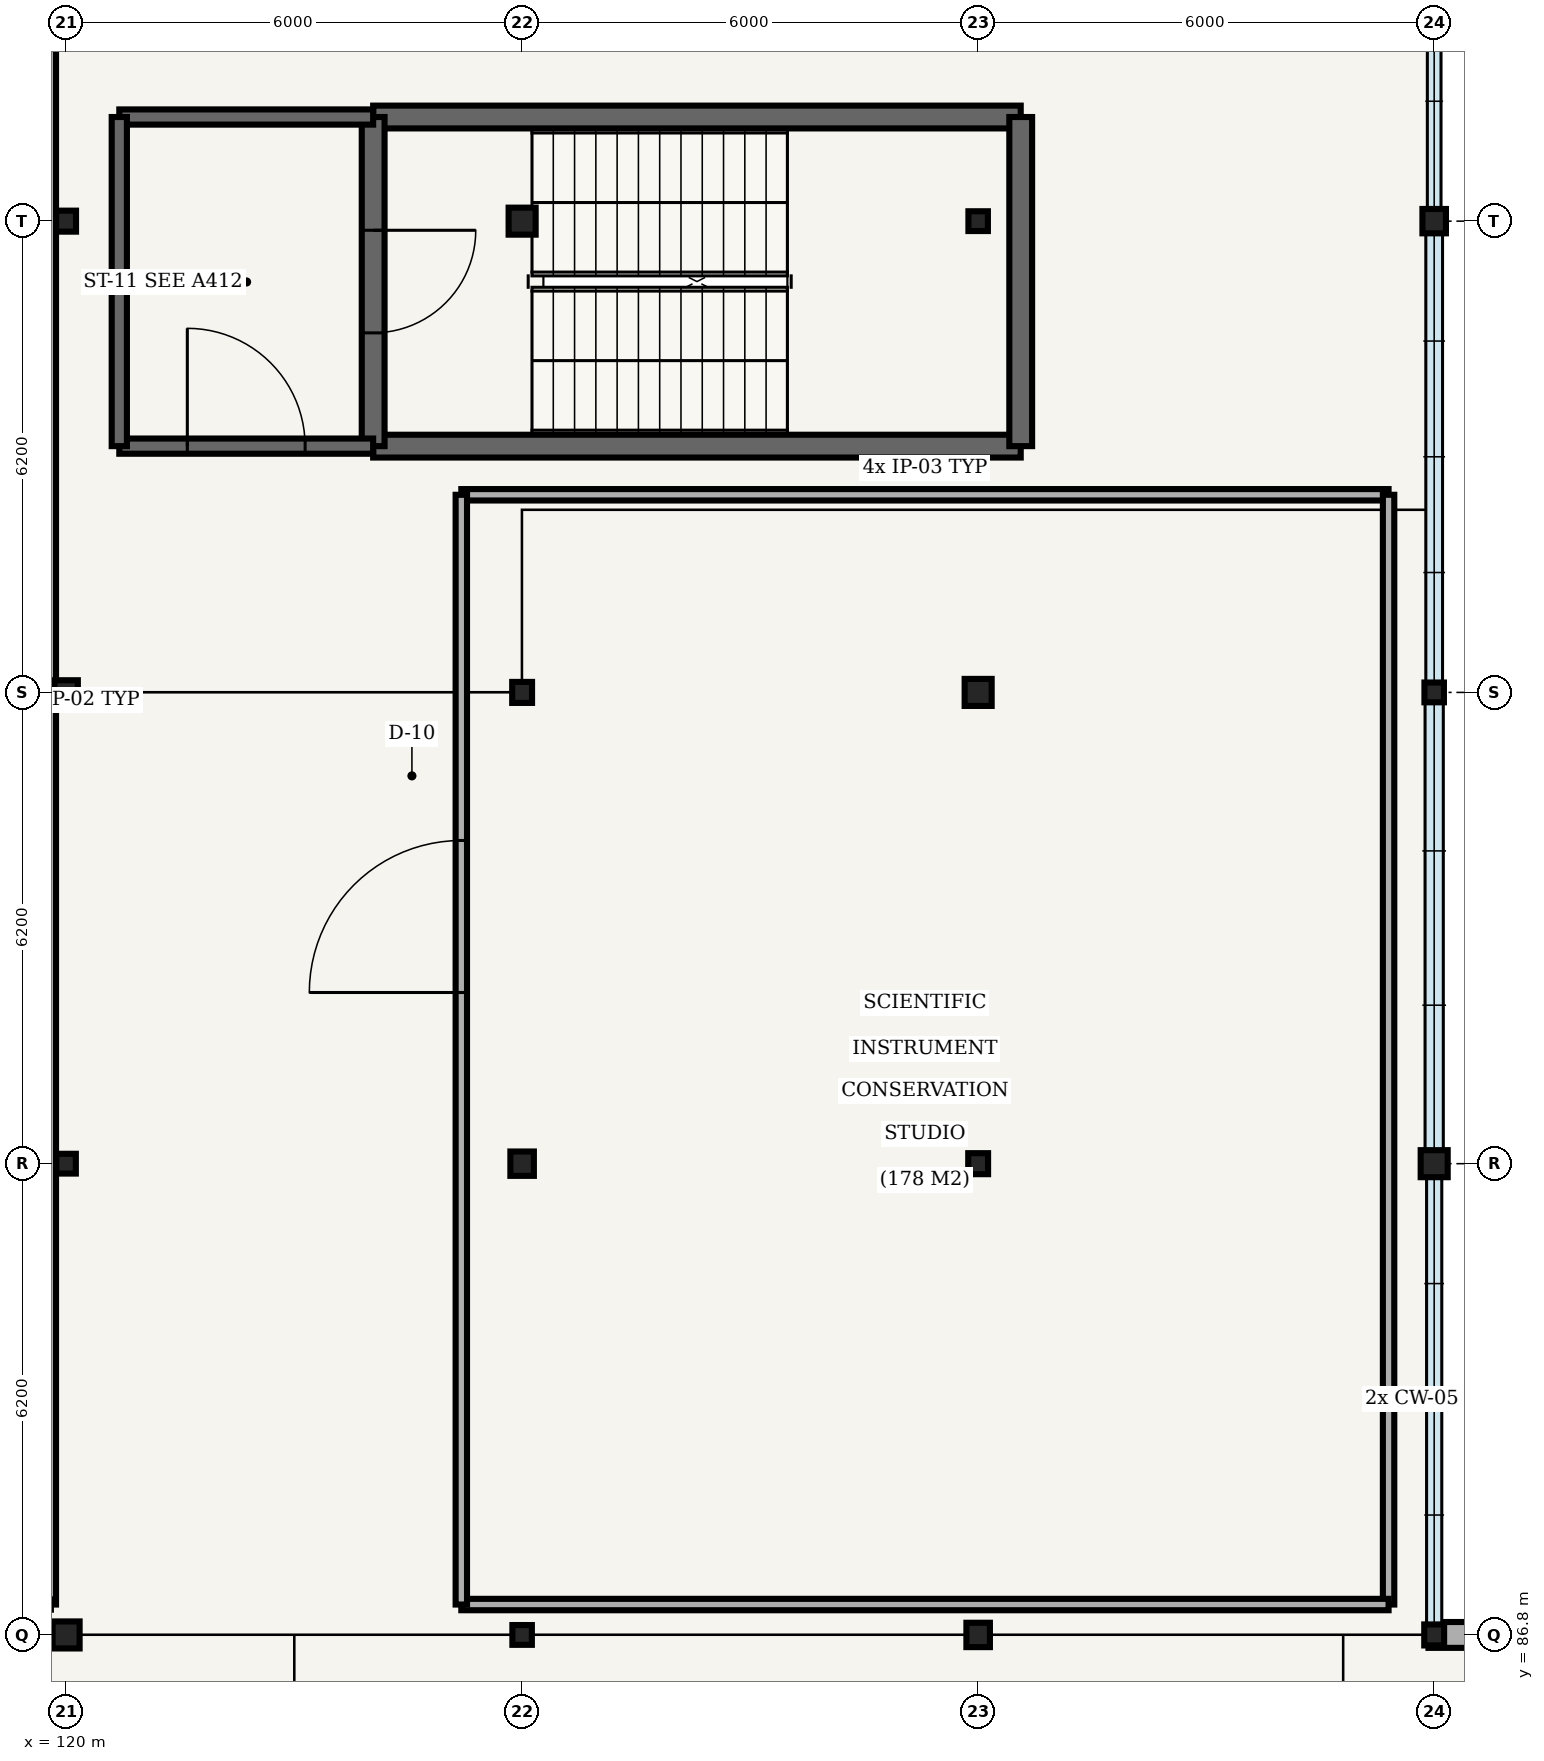
"""IFC4 building model, lengths in metres.
Left out: names, types, materials, properties, quantities, classifications, styles, units other than length and angle.
Written with IfcOpenShell. Run it as: python <this file> out.ifc"""

import sys

from ifc_helpers import new_model, si_unit, direction, frame, frame_2d, origin, origin_2d, place, context, subcontext, project, spatial, rectangle, hollow_circle, i_section, extrude, element, fill, save


model = new_model("IFC4")
c1 = context("Model", 3, precision=1e-05, world=origin(), true_north=direction((0.0, 1.0)))
c2 = subcontext(c1, "Body", "Model", "MODEL_VIEW")
j1 = project(units=[si_unit("LENGTHUNIT", "METRE"), si_unit("PLANEANGLEUNIT", "RADIAN")], contexts=[c1])
p1 = place(None, origin())
s1 = spatial("IfcSite", under=j1, at=p1, CompositionType="ELEMENT")
p2 = place(p1, origin())
s2 = spatial("IfcBuilding", under=s1, at=p2, CompositionType="ELEMENT")
p3 = place(p2, frame((0.0, 0.0, 10.8)))
s3 = spatial("IfcBuildingStorey", under=s2, at=p3, CompositionType="ELEMENT", Elevation=10.8)
p4 = place(p3, frame((120.0, 86.8, 0.0), z_axis=(0.0, 0.0, 1.0), x_axis=(1.0, 0.0, 0.0)))
e1 = element("IfcColumn", 1, at=p4, inside=s3, PredefinedType="COLUMN", context=c2, shape_type="SweptSolid", body=[
    extrude(hollow_circle(Radius=0.178, WallThickness=0.012, at=origin_2d()), origin(), (0.0, 0.0, 1.0), 4.8),
])
p5 = place(p3, frame((120.0, 93.0, 0.0), z_axis=(0.0, 0.0, 1.0), x_axis=(1.0, 0.0, 0.0)))
e2 = element("IfcColumn", 2, at=p5, inside=s3, PredefinedType="COLUMN", context=c2, shape_type="SweptSolid", body=[
    extrude(i_section(OverallWidth=0.256, OverallDepth=0.26, WebThickness=0.01, FlangeThickness=0.017, FilletRadius=0.013, at=origin_2d()), origin(), (0.0, 0.0, 1.0), 4.8),
])
p6 = place(p3, frame((120.0, 99.2, 0.0), z_axis=(0.0, 0.0, 1.0), x_axis=(1.0, 0.0, 0.0)))
e3 = element("IfcColumn", 3, at=p6, inside=s3, PredefinedType="COLUMN", context=c2, shape_type="SweptSolid", body=[
    extrude(i_section(OverallWidth=0.309, OverallDepth=0.321, WebThickness=0.014, FlangeThickness=0.022, FilletRadius=0.015, at=origin_2d()), origin(), (0.0, 0.0, 1.0), 4.8),
])
p7 = place(p3, frame((120.0, 105.4, 0.0), z_axis=(0.0, 0.0, 1.0), x_axis=(1.0, 0.0, 0.0)))
e4 = element("IfcColumn", 4, at=p7, inside=s3, PredefinedType="COLUMN", context=c2, shape_type="SweptSolid", body=[
    extrude(i_section(OverallWidth=0.261, OverallDepth=0.276, WebThickness=0.015, FlangeThickness=0.025, FilletRadius=0.013, at=origin_2d()), origin(), (0.0, 0.0, 1.0), 4.8),
])
p8 = place(p3, frame((126.0, 86.8, 0.0), z_axis=(0.0, 0.0, 1.0), x_axis=(1.0, 0.0, 0.0)))
e5 = element("IfcColumn", 5, at=p8, inside=s3, PredefinedType="COLUMN", context=c2, shape_type="SweptSolid", body=[
    extrude(i_section(OverallWidth=0.256, OverallDepth=0.26, WebThickness=0.01, FlangeThickness=0.017, FilletRadius=0.013, at=origin_2d()), origin(), (0.0, 0.0, 1.0), 4.8),
])
p9 = place(p3, frame((126.0, 93.0, 0.0), z_axis=(0.0, 0.0, 1.0), x_axis=(1.0, 0.0, 0.0)))
e6 = element("IfcColumn", 6, at=p9, inside=s3, PredefinedType="COLUMN", context=c2, shape_type="SweptSolid", body=[
    extrude(i_section(OverallWidth=0.309, OverallDepth=0.321, WebThickness=0.014, FlangeThickness=0.022, FilletRadius=0.015, at=origin_2d()), origin(), (0.0, 0.0, 1.0), 4.8),
])
p10 = place(p3, frame((126.0, 99.2, 0.0), z_axis=(0.0, 0.0, 1.0), x_axis=(1.0, 0.0, 0.0)))
e7 = element("IfcColumn", 7, at=p10, inside=s3, PredefinedType="COLUMN", context=c2, shape_type="SweptSolid", body=[
    extrude(i_section(OverallWidth=0.261, OverallDepth=0.276, WebThickness=0.015, FlangeThickness=0.025, FilletRadius=0.013, at=origin_2d()), origin(), (0.0, 0.0, 1.0), 4.8),
])
p11 = place(p3, frame((126.0, 105.4, 0.0), z_axis=(0.0, 0.0, 1.0), x_axis=(1.0, 0.0, 0.0)))
e8 = element("IfcColumn", 8, at=p11, inside=s3, PredefinedType="COLUMN", context=c2, shape_type="SweptSolid", body=[
    extrude(hollow_circle(Radius=0.178, WallThickness=0.012, at=origin_2d()), origin(), (0.0, 0.0, 1.0), 4.8),
])
p12 = place(p3, frame((132.0, 86.8, 0.0), z_axis=(0.0, 0.0, 1.0), x_axis=(1.0, 0.0, 0.0)))
e9 = element("IfcColumn", 9, at=p12, inside=s3, PredefinedType="COLUMN", context=c2, shape_type="SweptSolid", body=[
    extrude(i_section(OverallWidth=0.309, OverallDepth=0.321, WebThickness=0.014, FlangeThickness=0.022, FilletRadius=0.015, at=origin_2d()), origin(), (0.0, 0.0, 1.0), 4.8),
])
p13 = place(p3, frame((132.0, 93.0, 0.0), z_axis=(0.0, 0.0, 1.0), x_axis=(1.0, 0.0, 0.0)))
e10 = element("IfcColumn", 10, at=p13, inside=s3, PredefinedType="COLUMN", context=c2, shape_type="SweptSolid", body=[
    extrude(i_section(OverallWidth=0.261, OverallDepth=0.276, WebThickness=0.015, FlangeThickness=0.025, FilletRadius=0.013, at=origin_2d()), origin(), (0.0, 0.0, 1.0), 4.8),
])
p14 = place(p3, frame((132.0, 99.2, 0.0), z_axis=(0.0, 0.0, 1.0), x_axis=(1.0, 0.0, 0.0)))
e11 = element("IfcColumn", 11, at=p14, inside=s3, PredefinedType="COLUMN", context=c2, shape_type="SweptSolid", body=[
    extrude(hollow_circle(Radius=0.178, WallThickness=0.012, at=origin_2d()), origin(), (0.0, 0.0, 1.0), 4.8),
])
p15 = place(p3, frame((132.0, 105.4, 0.0), z_axis=(0.0, 0.0, 1.0), x_axis=(1.0, 0.0, 0.0)))
e12 = element("IfcColumn", 12, at=p15, inside=s3, PredefinedType="COLUMN", context=c2, shape_type="SweptSolid", body=[
    extrude(i_section(OverallWidth=0.256, OverallDepth=0.26, WebThickness=0.01, FlangeThickness=0.017, FilletRadius=0.013, at=origin_2d()), origin(), (0.0, 0.0, 1.0), 4.8),
])
p16 = place(p3, frame((138.0, 86.8, 0.0), z_axis=(0.0, 0.0, 1.0), x_axis=(1.0, 0.0, 0.0)))
e13 = element("IfcColumn", 13, at=p16, inside=s3, PredefinedType="COLUMN", context=c2, shape_type="SweptSolid", body=[
    extrude(i_section(OverallWidth=0.261, OverallDepth=0.276, WebThickness=0.015, FlangeThickness=0.025, FilletRadius=0.013, at=origin_2d()), origin(), (0.0, 0.0, 1.0), 4.8),
])
p17 = place(p3, frame((138.0, 93.0, 0.0), z_axis=(0.0, 0.0, 1.0), x_axis=(1.0, 0.0, 0.0)))
e14 = element("IfcColumn", 14, at=p17, inside=s3, PredefinedType="COLUMN", context=c2, shape_type="SweptSolid", body=[
    extrude(hollow_circle(Radius=0.178, WallThickness=0.012, at=origin_2d()), origin(), (0.0, 0.0, 1.0), 4.8),
])
p18 = place(p3, frame((138.0, 99.2, 0.0), z_axis=(0.0, 0.0, 1.0), x_axis=(1.0, 0.0, 0.0)))
e15 = element("IfcColumn", 15, at=p18, inside=s3, PredefinedType="COLUMN", context=c2, shape_type="SweptSolid", body=[
    extrude(i_section(OverallWidth=0.256, OverallDepth=0.26, WebThickness=0.01, FlangeThickness=0.017, FilletRadius=0.013, at=origin_2d()), origin(), (0.0, 0.0, 1.0), 4.8),
])
p19 = place(p3, frame((138.0, 105.4, 0.0), z_axis=(0.0, 0.0, 1.0), x_axis=(1.0, 0.0, 0.0)))
e16 = element("IfcColumn", 16, at=p19, inside=s3, PredefinedType="COLUMN", context=c2, shape_type="SweptSolid", body=[
    extrude(i_section(OverallWidth=0.309, OverallDepth=0.321, WebThickness=0.014, FlangeThickness=0.022, FilletRadius=0.015, at=origin_2d()), origin(), (0.0, 0.0, 1.0), 4.8),
])
p20 = place(p3, frame((144.075, 86.8, 0.0), z_axis=(0.0, 0.0, 1.0), x_axis=(-1.0, 0.0, 0.0)))
e17 = element("IfcWall", 17, at=p20, inside=s3, PredefinedType="SOLIDWALL", context=c2, shape_type="SweptSolid", body=[
    extrude(rectangle(XDim=6.15, YDim=0.34, at=frame_2d((3.075, 0.0))), origin(), (0.0, 0.0, 1.0), 3.84),
])
p21 = place(p20, frame((2.45, 0.0, 0.9)))
e18 = element("IfcOpeningElement", 18, at=p21, cuts=e17, PredefinedType="OPENING", context=c2, shape_type="SweptSolid", body=[
    extrude(rectangle(XDim=1.25, YDim=1.95, at=frame_2d((0.625, 0.975))), frame((0.0, 0.18, 0.0), z_axis=(0.0, -1.0, 0.0), x_axis=(1.0, 0.0, 0.0)), (0.0, 0.0, 1.0), 0.36),
])
for number, where, z_axis, x_axis in (
    (19, (124.04, 102.44, 0.0), (0.0, 0.0, 1.0), (1.0, 0.0, 0.0)),
    (20, (132.56, 106.77, 0.0), (0.0, 0.0, 1.0), (-1.0, 0.0, 0.0)),
):
    element("IfcWall", number, at=place(p3, frame(where, z_axis=z_axis, x_axis=x_axis)), inside=s3, PredefinedType="SHEAR", context=c2, shape_type="SweptSolid", body=[
        extrude(rectangle(XDim=8.52, YDim=0.3, at=frame_2d((4.26, 0.0))), origin(), (0.0, 0.0, 1.0), 4.55),
    ])
p22 = place(p3, frame((124.04, 106.77, 0.0), z_axis=(0.0, 0.0, 1.0), x_axis=(0.0, -1.0, 0.0)))
e21 = element("IfcWall", 21, at=p22, inside=s3, PredefinedType="SHEAR", context=c2, shape_type="SweptSolid", body=[
    extrude(rectangle(XDim=4.33, YDim=0.3, at=frame_2d((2.165, 0.0))), origin(), (0.0, 0.0, 1.0), 4.55),
])
p23 = place(p22, frame((1.49, 0.0, 0.0)))
e22 = element("IfcOpeningElement", 22, at=p23, cuts=e21, PredefinedType="OPENING", context=c2, shape_type="SweptSolid", body=[
    extrude(rectangle(XDim=1.35, YDim=2.2, at=frame_2d((0.675, 1.1))), frame((0.0, 0.16, 0.0), z_axis=(0.0, -1.0, 0.0), x_axis=(1.0, 0.0, 0.0)), (0.0, 0.0, 1.0), 0.32),
])
p24 = place(p3, frame((132.56, 102.44, 0.0), z_axis=(0.0, 0.0, 1.0), x_axis=(0.0, 1.0, 0.0)))
e23 = element("IfcWall", 23, at=p24, inside=s3, PredefinedType="SHEAR", context=c2, shape_type="SweptSolid", body=[
    extrude(rectangle(XDim=4.33, YDim=0.3, at=frame_2d((2.165, 0.0))), origin(), (0.0, 0.0, 1.0), 4.55),
])
p25 = place(p3, frame((120.7, 102.44, 0.0), z_axis=(0.0, 0.0, 1.0), x_axis=(1.0, 0.0, 0.0)))
e24 = element("IfcWall", 24, at=p25, inside=s3, PredefinedType="SHEAR", context=c2, shape_type="SweptSolid", body=[
    extrude(rectangle(XDim=3.34, YDim=0.2, at=frame_2d((1.67, 0.0))), origin(), (0.0, 0.0, 1.0), 4.55),
])
p26 = place(p25, frame((0.895, 0.0, 0.0)))
e25 = element("IfcOpeningElement", 25, at=p26, cuts=e24, PredefinedType="OPENING", context=c2, shape_type="SweptSolid", body=[
    extrude(rectangle(XDim=1.55, YDim=2.2, at=frame_2d((0.775, 1.1))), frame((0.0, 0.11, 0.0), z_axis=(0.0, -1.0, 0.0), x_axis=(1.0, 0.0, 0.0)), (0.0, 0.0, 1.0), 0.22),
])
p27 = place(p3, frame((124.04, 106.77, 0.0), z_axis=(0.0, 0.0, 1.0), x_axis=(-1.0, 0.0, 0.0)))
e26 = element("IfcWall", 26, at=p27, inside=s3, PredefinedType="SHEAR", context=c2, shape_type="SweptSolid", body=[
    extrude(rectangle(XDim=3.34, YDim=0.2, at=frame_2d((1.67, 0.0))), origin(), (0.0, 0.0, 1.0), 4.55),
])
p28 = place(p3, frame((120.7, 106.77, 0.0), z_axis=(0.0, 0.0, 1.0), x_axis=(0.0, -1.0, 0.0)))
e27 = element("IfcWall", 27, at=p28, inside=s3, PredefinedType="SHEAR", context=c2, shape_type="SweptSolid", body=[
    extrude(rectangle(XDim=4.33, YDim=0.2, at=frame_2d((2.165, 0.0))), origin(), (0.0, 0.0, 1.0), 4.55),
])
p29 = place(p3, frame((119.8, 111.0, 0.0), z_axis=(0.0, 0.0, 1.0), x_axis=(0.0, -1.0, 0.0)))
e28 = element("IfcWall", 28, at=p29, inside=s3, PredefinedType="PARTITIONING", context=c2, shape_type="SweptSolid", body=[
    extrude(rectangle(XDim=23.8, YDim=0.135, at=frame_2d((11.9, 0.0))), origin(), (0.0, 0.0, 1.0), 3.52),
])
p30 = place(p3, frame((125.2, 101.8, 0.0), z_axis=(0.0, 0.0, 1.0), x_axis=(1.0, 0.0, 0.0)))
e29 = element("IfcWall", 29, at=p30, inside=s3, PredefinedType="PARTITIONING", context=c2, shape_type="SweptSolid", body=[
    extrude(rectangle(XDim=12.2, YDim=0.15, at=frame_2d((6.1, 0.0))), origin(), (0.0, 0.0, 1.0), 3.52),
])
p31 = place(p3, frame((137.4, 101.8, 0.0), z_axis=(0.0, 0.0, 1.0), x_axis=(0.0, -1.0, 0.0)))
e30 = element("IfcWall", 30, at=p31, inside=s3, PredefinedType="PARTITIONING", context=c2, shape_type="SweptSolid", body=[
    extrude(rectangle(XDim=14.6, YDim=0.15, at=frame_2d((7.3, 0.0))), origin(), (0.0, 0.0, 1.0), 3.52),
])
p32 = place(p3, frame((137.4, 87.2, 0.0), z_axis=(0.0, 0.0, 1.0), x_axis=(-1.0, 0.0, 0.0)))
e31 = element("IfcWall", 31, at=p32, inside=s3, PredefinedType="PARTITIONING", context=c2, shape_type="SweptSolid", body=[
    extrude(rectangle(XDim=12.2, YDim=0.15, at=frame_2d((6.1, 0.0))), origin(), (0.0, 0.0, 1.0), 3.52),
])
p33 = place(p3, frame((125.2, 87.2, 0.0), z_axis=(0.0, 0.0, 1.0), x_axis=(0.0, 1.0, 0.0)))
e32 = element("IfcWall", 32, at=p33, inside=s3, PredefinedType="PARTITIONING", context=c2, shape_type="SweptSolid", body=[
    extrude(rectangle(XDim=14.6, YDim=0.15, at=frame_2d((7.3, 0.0))), origin(), (0.0, 0.0, 1.0), 3.52),
])
p34 = place(p33, frame((8.052, 0.0, 0.0)))
e33 = element("IfcOpeningElement", 33, at=p34, cuts=e32, PredefinedType="OPENING", context=c2, shape_type="SweptSolid", body=[
    extrude(rectangle(XDim=2.0, YDim=2.1, at=frame_2d((1.0, 1.05))), frame((0.0, 0.085, 0.0), z_axis=(0.0, -1.0, 0.0), x_axis=(1.0, 0.0, 0.0)), (0.0, 0.0, 1.0), 0.17),
])
p35 = place(p23, origin())
e34 = element("IfcDoor", 34, at=p35, inside=s3, OperationType="SINGLE_SWING_LEFT", PredefinedType="DOOR", context=c2, shape_type="SweptSolid", body=[
    extrude(rectangle(XDim=1.35, YDim=2.2, at=frame_2d((0.675, 1.1))), frame((0.0, 0.025, 0.0), z_axis=(0.0, -1.0, 0.0), x_axis=(1.0, 0.0, 0.0)), (0.0, 0.0, 1.0), 0.05),
])
fill(e22, e34)
p36 = place(p26, origin())
e35 = element("IfcDoor", 35, at=p36, inside=s3, OperationType="SINGLE_SWING_LEFT", PredefinedType="DOOR", context=c2, shape_type="SweptSolid", body=[
    extrude(rectangle(XDim=1.55, YDim=2.2, at=frame_2d((0.775, 1.1))), frame((0.0, 0.025, 0.0), z_axis=(0.0, -1.0, 0.0), x_axis=(1.0, 0.0, 0.0)), (0.0, 0.0, 1.0), 0.05),
])
fill(e25, e35)
p37 = place(p34, origin())
e36 = element("IfcDoor", 36, at=p37, inside=s3, OperationType="DOUBLE_DOOR_SINGLE_SWING", PredefinedType="DOOR", context=c2, shape_type="SweptSolid", body=[
    extrude(rectangle(XDim=2.0, YDim=2.1, at=frame_2d((1.0, 1.05))), frame((0.0, 0.025, 0.0), z_axis=(0.0, -1.0, 0.0), x_axis=(1.0, 0.0, 0.0)), (0.0, 0.0, 1.0), 0.05),
])
fill(e33, e36)
save(model, sys.argv[1])
